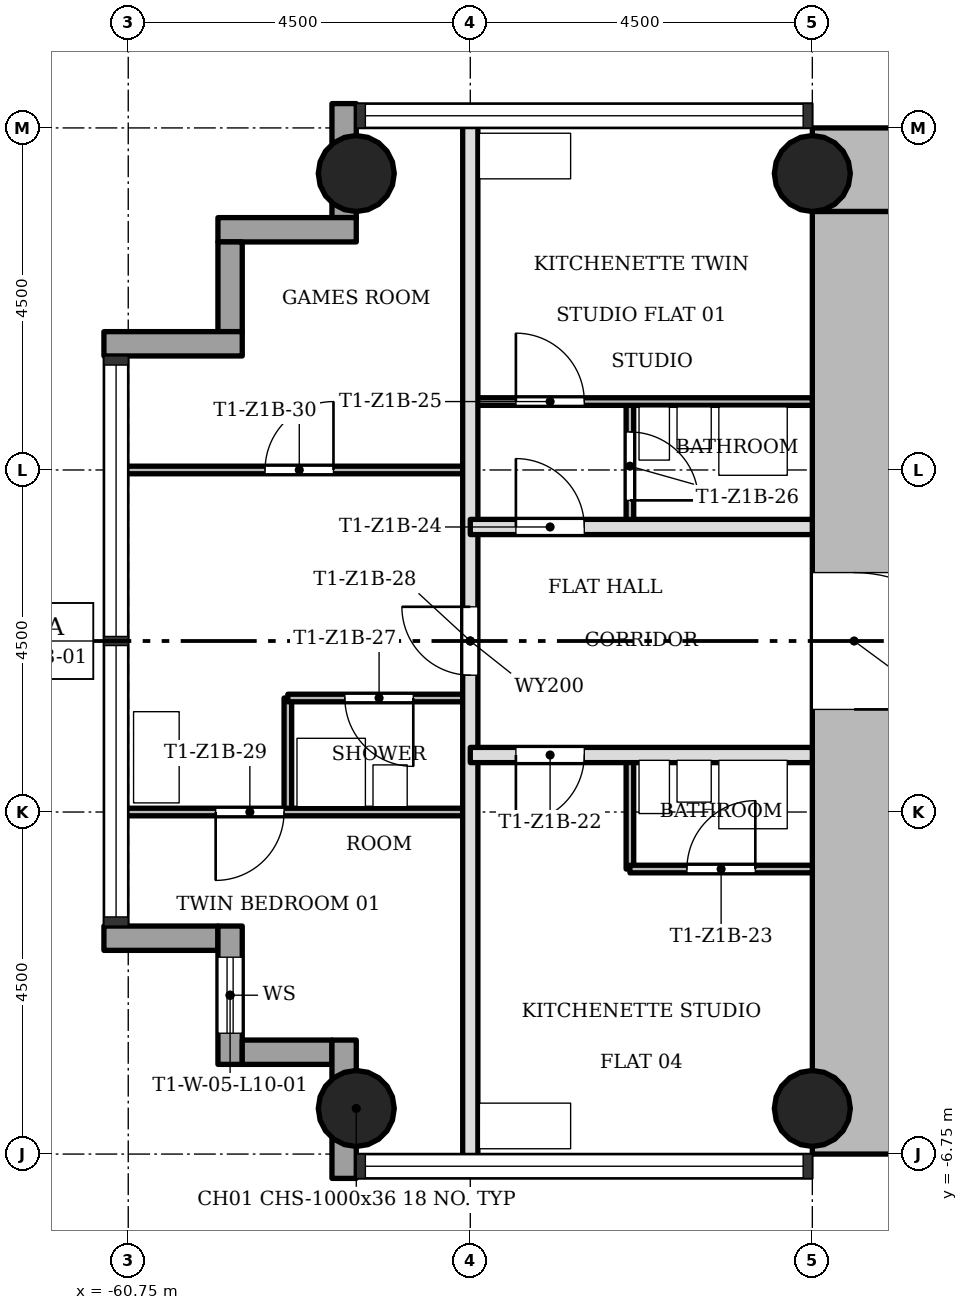
"""IFC4 building model, lengths in metres.
Left out: names, types, materials, properties, quantities, classifications, styles, units other than length and angle.
Written with IfcOpenShell. Run it as: python <this file> out.ifc"""

import sys

from ifc_helpers import new_model, si_unit, direction, frame, frame_2d, origin, origin_2d, place, context, subcontext, project, spatial, rectangle, hollow_circle, extrude, element, fill, save


model = new_model("IFC4")
c1 = context("Model", 3, precision=1e-05, world=origin(), true_north=direction((0.0, 1.0)))
c2 = subcontext(c1, "Body", "Model", "MODEL_VIEW")
j1 = project(units=[si_unit("LENGTHUNIT", "METRE"), si_unit("PLANEANGLEUNIT", "RADIAN")], contexts=[c1])
p1 = place(None, origin())
s1 = spatial("IfcSite", under=j1, at=p1, CompositionType="ELEMENT")
p2 = place(p1, origin())
s2 = spatial("IfcBuilding", under=s1, at=p2, CompositionType="ELEMENT")
p3 = place(p2, frame((0.0, 0.0, 41.5)))
s3 = spatial("IfcBuildingStorey", under=s2, at=p3, CompositionType="ELEMENT", Elevation=41.5)
p4 = place(p3, frame((-43.85, 6.2, 0.0), z_axis=(0.0, 0.0, 1.0), x_axis=(-1.0, 0.0, 0.0)))
e1 = element("IfcWall", 1, at=p4, inside=s3, PredefinedType="SHEAR", context=c2, shape_type="SweptSolid", body=[
    extrude(rectangle(XDim=7.9, YDim=1.1, at=frame_2d((3.95, 0.0))), origin(), (0.0, 0.0, 1.0), 3.4),
])
p5 = place(p3, frame((-51.2, 5.65, 0.0), z_axis=(0.0, 0.0, 1.0), x_axis=(0.0, -1.0, 0.0)))
e2 = element("IfcWall", 2, at=p5, inside=s3, PredefinedType="SHEAR", context=c2, shape_type="SweptSolid", body=[
    extrude(rectangle(XDim=12.4, YDim=1.1, at=frame_2d((6.2, 0.0))), origin(), (0.0, 0.0, 1.0), 3.4),
])
p6 = place(p5, frame((4.75, 0.0, 0.0)))
e3 = element("IfcOpeningElement", 3, at=p6, cuts=e2, PredefinedType="OPENING", context=c2, shape_type="SweptSolid", body=[
    extrude(rectangle(XDim=1.8, YDim=2.1, at=frame_2d((0.9, 1.05))), frame((0.0, 0.56, 0.0), z_axis=(0.0, -1.0, 0.0), x_axis=(1.0, 0.0, 0.0)), (0.0, 0.0, 1.0), 1.12),
])
for number, where, z_axis, x_axis in (
    (4, (-51.75, -6.15, 0.0), (0.0, 0.0, 1.0), (1.0, 0.0, 0.0)),
    (5, (-51.75, 6.15, 0.0), (0.0, 0.0, 1.0), (1.0, 0.0, 0.0)),
    (6, (-57.75, -6.15, 0.0), (0.0, 0.0, 1.0), (1.0, 0.0, 0.0)),
    (7, (-57.75, 6.15, 0.0), (0.0, 0.0, 1.0), (1.0, 0.0, 0.0)),
):
    element("IfcColumn", number, at=place(p3, frame(where, z_axis=z_axis, x_axis=x_axis)), inside=s3, PredefinedType="COLUMN", context=c2, shape_type="SweptSolid", body=[
        extrude(hollow_circle(Radius=0.5, WallThickness=0.036, at=origin_2d()), origin(), (0.0, 0.0, 1.0), 3.4),
    ])
p7 = place(p3, frame((-61.07, -3.91, -0.3), z_axis=(0.0, 0.0, 1.0), x_axis=(1.0, 0.0, 0.0)))
e8 = element("IfcWall", 8, at=p7, inside=s3, PredefinedType="STANDARD", context=c2, shape_type="SweptSolid", body=[
    extrude(rectangle(XDim=1.5, YDim=0.32, at=frame_2d((0.75, 0.0))), origin(), (0.0, 0.0, 1.0), 3.4),
])
p8 = place(p3, frame((-59.41, -3.75, -0.3), z_axis=(0.0, 0.0, 1.0), x_axis=(0.0, -1.0, 0.0)))
e9 = element("IfcWall", 9, at=p8, inside=s3, PredefinedType="STANDARD", context=c2, shape_type="SweptSolid", body=[
    extrude(rectangle(XDim=1.82, YDim=0.32, at=frame_2d((0.91, 0.0))), origin(), (0.0, 0.0, 1.0), 3.4),
])
p9 = place(p8, frame((0.41, 0.0, 1.2)))
e10 = element("IfcOpeningElement", 10, at=p9, cuts=e9, PredefinedType="OPENING", context=c2, shape_type="SweptSolid", body=[
    extrude(rectangle(XDim=1.0, YDim=1.5, at=frame_2d((0.5, 0.75))), frame((0.0, 0.17, 0.0), z_axis=(0.0, -1.0, 0.0), x_axis=(1.0, 0.0, 0.0)), (0.0, 0.0, 1.0), 0.34),
])
p10 = place(p3, frame((-59.25, -5.41, -0.3), z_axis=(0.0, 0.0, 1.0), x_axis=(1.0, 0.0, 0.0)))
e11 = element("IfcWall", 11, at=p10, inside=s3, PredefinedType="STANDARD", context=c2, shape_type="SweptSolid", body=[
    extrude(rectangle(XDim=1.18, YDim=0.32, at=frame_2d((0.59, 0.0))), origin(), (0.0, 0.0, 1.0), 3.4),
])
p11 = place(p3, frame((-57.91, -5.25, -0.3), z_axis=(0.0, 0.0, 1.0), x_axis=(0.0, -1.0, 0.0)))
e12 = element("IfcWall", 12, at=p11, inside=s3, PredefinedType="STANDARD", context=c2, shape_type="SweptSolid", body=[
    extrude(rectangle(XDim=1.82, YDim=0.32, at=frame_2d((0.91, 0.0))), origin(), (0.0, 0.0, 1.0), 3.4),
])
p12 = place(p3, frame((-57.91, 7.07, -0.3), z_axis=(0.0, 0.0, 1.0), x_axis=(0.0, -1.0, 0.0)))
e13 = element("IfcWall", 13, at=p12, inside=s3, PredefinedType="STANDARD", context=c2, shape_type="SweptSolid", body=[
    extrude(rectangle(XDim=1.5, YDim=0.32, at=frame_2d((0.75, 0.0))), origin(), (0.0, 0.0, 1.0), 3.4),
])
p13 = place(p3, frame((-57.75, 5.41, -0.3), z_axis=(0.0, 0.0, 1.0), x_axis=(-1.0, 0.0, 0.0)))
e14 = element("IfcWall", 14, at=p13, inside=s3, PredefinedType="STANDARD", context=c2, shape_type="SweptSolid", body=[
    extrude(rectangle(XDim=1.82, YDim=0.32, at=frame_2d((0.91, 0.0))), origin(), (0.0, 0.0, 1.0), 3.4),
])
p14 = place(p3, frame((-59.41, 5.25, -0.3), z_axis=(0.0, 0.0, 1.0), x_axis=(0.0, -1.0, 0.0)))
e15 = element("IfcWall", 15, at=p14, inside=s3, PredefinedType="STANDARD", context=c2, shape_type="SweptSolid", body=[
    extrude(rectangle(XDim=1.18, YDim=0.32, at=frame_2d((0.59, 0.0))), origin(), (0.0, 0.0, 1.0), 3.4),
])
p15 = place(p3, frame((-59.25, 3.91, -0.3), z_axis=(0.0, 0.0, 1.0), x_axis=(-1.0, 0.0, 0.0)))
e16 = element("IfcWall", 16, at=p15, inside=s3, PredefinedType="STANDARD", context=c2, shape_type="SweptSolid", body=[
    extrude(rectangle(XDim=1.82, YDim=0.32, at=frame_2d((0.91, 0.0))), origin(), (0.0, 0.0, 1.0), 3.4),
])
p16 = place(p3, frame((-58.65, -2.25, 0.0), z_axis=(0.0, 0.0, 1.0), x_axis=(0.0, 1.0, 0.0)))
e17 = element("IfcWall", 17, at=p16, inside=s3, PredefinedType="PARTITIONING", context=c2, shape_type="SweptSolid", body=[
    extrude(rectangle(XDim=1.5, YDim=0.1, at=frame_2d((0.75, 0.0))), origin(), (0.0, 0.0, 1.0), 3.0),
])
p17 = place(p3, frame((-56.25, -6.85, 0.0), z_axis=(0.0, 0.0, 1.0), x_axis=(0.0, 1.0, 0.0)))
e18 = element("IfcWall", 18, at=p17, inside=s3, PredefinedType="SOLIDWALL", context=c2, shape_type="SweptSolid", body=[
    extrude(rectangle(XDim=13.7, YDim=0.2, at=frame_2d((6.85, 0.0))), origin(), (0.0, 0.0, 1.0), 3.0),
])
p18 = place(p17, frame((6.4, 0.0, 0.0)))
e19 = element("IfcOpeningElement", 19, at=p18, cuts=e18, PredefinedType="OPENING", context=c2, shape_type="SweptSolid", body=[
    extrude(rectangle(XDim=0.9, YDim=2.1, at=frame_2d((0.45, 1.05))), frame((0.0, 0.11, 0.0), z_axis=(0.0, -1.0, 0.0), x_axis=(1.0, 0.0, 0.0)), (0.0, 0.0, 1.0), 0.22),
])
p19 = place(p3, frame((-54.15, -3.0, 0.0), z_axis=(0.0, 0.0, 1.0), x_axis=(0.0, 1.0, 0.0)))
e20 = element("IfcWall", 20, at=p19, inside=s3, PredefinedType="PARTITIONING", context=c2, shape_type="SweptSolid", body=[
    extrude(rectangle(XDim=1.5, YDim=0.1, at=frame_2d((0.75, 0.0))), origin(), (0.0, 0.0, 1.0), 3.0),
])
p20 = place(p3, frame((-54.15, 1.5, 0.0), z_axis=(0.0, 0.0, 1.0), x_axis=(0.0, 1.0, 0.0)))
e21 = element("IfcWall", 21, at=p20, inside=s3, PredefinedType="PARTITIONING", context=c2, shape_type="SweptSolid", body=[
    extrude(rectangle(XDim=1.65, YDim=0.1, at=frame_2d((0.825, 0.0))), origin(), (0.0, 0.0, 1.0), 3.0),
])
p21 = place(p20, frame((0.35, 0.0, 0.0)))
e22 = element("IfcOpeningElement", 22, at=p21, cuts=e21, PredefinedType="OPENING", context=c2, shape_type="SweptSolid", body=[
    extrude(rectangle(XDim=0.9, YDim=2.1, at=frame_2d((0.45, 1.05))), frame((0.0, 0.06, 0.0), z_axis=(0.0, -1.0, 0.0), x_axis=(1.0, 0.0, 0.0)), (0.0, 0.0, 1.0), 0.12),
])
p22 = place(p3, frame((-54.15, -3.0, 0.0), z_axis=(0.0, 0.0, 1.0), x_axis=(1.0, 0.0, 0.0)))
e23 = element("IfcWall", 23, at=p22, inside=s3, PredefinedType="PARTITIONING", context=c2, shape_type="SweptSolid", body=[
    extrude(rectangle(XDim=2.4, YDim=0.1, at=frame_2d((1.2, 0.0))), origin(), (0.0, 0.0, 1.0), 3.0),
])
p23 = place(p22, frame((0.75, 0.0, 0.0)))
e24 = element("IfcOpeningElement", 24, at=p23, cuts=e23, PredefinedType="OPENING", context=c2, shape_type="SweptSolid", body=[
    extrude(rectangle(XDim=0.9, YDim=2.1, at=frame_2d((0.45, 1.05))), frame((0.0, 0.06, 0.0), z_axis=(0.0, -1.0, 0.0), x_axis=(1.0, 0.0, 0.0)), (0.0, 0.0, 1.0), 0.12),
])
p24 = place(p3, frame((-60.85, -2.25, 0.0), z_axis=(0.0, 0.0, 1.0), x_axis=(1.0, 0.0, 0.0)))
e25 = element("IfcWall", 25, at=p24, inside=s3, PredefinedType="PARTITIONING", context=c2, shape_type="SweptSolid", body=[
    extrude(rectangle(XDim=4.6, YDim=0.1, at=frame_2d((2.3, 0.0))), origin(), (0.0, 0.0, 1.0), 3.0),
])
p25 = place(p24, frame((1.25, 0.0, 0.0)))
e26 = element("IfcOpeningElement", 26, at=p25, cuts=e25, PredefinedType="OPENING", context=c2, shape_type="SweptSolid", body=[
    extrude(rectangle(XDim=0.9, YDim=2.1, at=frame_2d((0.45, 1.05))), frame((0.0, 0.06, 0.0), z_axis=(0.0, -1.0, 0.0), x_axis=(1.0, 0.0, 0.0)), (0.0, 0.0, 1.0), 0.12),
])
p26 = place(p3, frame((-56.25, -1.5, 0.0), z_axis=(0.0, 0.0, 1.0), x_axis=(1.0, 0.0, 0.0)))
e27 = element("IfcWall", 27, at=p26, inside=s3, PredefinedType="SOLIDWALL", context=c2, shape_type="SweptSolid", body=[
    extrude(rectangle(XDim=4.5, YDim=0.2, at=frame_2d((2.25, 0.0))), origin(), (0.0, 0.0, 1.0), 3.0),
])
p27 = place(p26, frame((0.6, 0.0, 0.0)))
e28 = element("IfcOpeningElement", 28, at=p27, cuts=e27, PredefinedType="OPENING", context=c2, shape_type="SweptSolid", body=[
    extrude(rectangle(XDim=0.9, YDim=2.1, at=frame_2d((0.45, 1.05))), frame((0.0, 0.11, 0.0), z_axis=(0.0, -1.0, 0.0), x_axis=(1.0, 0.0, 0.0)), (0.0, 0.0, 1.0), 0.22),
])
p28 = place(p3, frame((-58.65, -0.75, 0.0), z_axis=(0.0, 0.0, 1.0), x_axis=(1.0, 0.0, 0.0)))
e29 = element("IfcWall", 29, at=p28, inside=s3, PredefinedType="PARTITIONING", context=c2, shape_type="SweptSolid", body=[
    extrude(rectangle(XDim=2.4, YDim=0.1, at=frame_2d((1.2, 0.0))), origin(), (0.0, 0.0, 1.0), 3.0),
])
p29 = place(p28, frame((0.75, 0.0, 0.0)))
e30 = element("IfcOpeningElement", 30, at=p29, cuts=e29, PredefinedType="OPENING", context=c2, shape_type="SweptSolid", body=[
    extrude(rectangle(XDim=0.9, YDim=2.1, at=frame_2d((0.45, 1.05))), frame((0.0, 0.06, 0.0), z_axis=(0.0, -1.0, 0.0), x_axis=(1.0, 0.0, 0.0)), (0.0, 0.0, 1.0), 0.12),
])
p30 = place(p3, frame((-56.25, 1.5, 0.0), z_axis=(0.0, 0.0, 1.0), x_axis=(1.0, 0.0, 0.0)))
e31 = element("IfcWall", 31, at=p30, inside=s3, PredefinedType="SOLIDWALL", context=c2, shape_type="SweptSolid", body=[
    extrude(rectangle(XDim=4.5, YDim=0.2, at=frame_2d((2.25, 0.0))), origin(), (0.0, 0.0, 1.0), 3.0),
])
p31 = place(p30, frame((0.6, 0.0, 0.0)))
e32 = element("IfcOpeningElement", 32, at=p31, cuts=e31, PredefinedType="OPENING", context=c2, shape_type="SweptSolid", body=[
    extrude(rectangle(XDim=0.9, YDim=2.1, at=frame_2d((0.45, 1.05))), frame((0.0, 0.11, 0.0), z_axis=(0.0, -1.0, 0.0), x_axis=(1.0, 0.0, 0.0)), (0.0, 0.0, 1.0), 0.22),
])
p32 = place(p3, frame((-60.85, 2.25, 0.0), z_axis=(0.0, 0.0, 1.0), x_axis=(1.0, 0.0, 0.0)))
e33 = element("IfcWall", 33, at=p32, inside=s3, PredefinedType="PARTITIONING", context=c2, shape_type="SweptSolid", body=[
    extrude(rectangle(XDim=4.6, YDim=0.1, at=frame_2d((2.3, 0.0))), origin(), (0.0, 0.0, 1.0), 3.0),
])
p33 = place(p32, frame((1.9, 0.0, 0.0)))
e34 = element("IfcOpeningElement", 34, at=p33, cuts=e33, PredefinedType="OPENING", context=c2, shape_type="SweptSolid", body=[
    extrude(rectangle(XDim=0.9, YDim=2.1, at=frame_2d((0.45, 1.05))), frame((0.0, 0.06, 0.0), z_axis=(0.0, -1.0, 0.0), x_axis=(1.0, 0.0, 0.0)), (0.0, 0.0, 1.0), 0.12),
])
p34 = place(p3, frame((-56.25, 3.15, 0.0), z_axis=(0.0, 0.0, 1.0), x_axis=(1.0, 0.0, 0.0)))
e35 = element("IfcWall", 35, at=p34, inside=s3, PredefinedType="PARTITIONING", context=c2, shape_type="SweptSolid", body=[
    extrude(rectangle(XDim=4.5, YDim=0.1, at=frame_2d((2.25, 0.0))), origin(), (0.0, 0.0, 1.0), 3.0),
])
p35 = place(p34, frame((0.6, 0.0, 0.0)))
e36 = element("IfcOpeningElement", 36, at=p35, cuts=e35, PredefinedType="OPENING", context=c2, shape_type="SweptSolid", body=[
    extrude(rectangle(XDim=0.9, YDim=2.1, at=frame_2d((0.45, 1.05))), frame((0.0, 0.06, 0.0), z_axis=(0.0, -1.0, 0.0), x_axis=(1.0, 0.0, 0.0)), (0.0, 0.0, 1.0), 0.12),
])
p36 = place(p27, origin())
e37 = element("IfcDoor", 37, at=p36, inside=s3, OperationType="SINGLE_SWING_LEFT", PredefinedType="DOOR", context=c2, shape_type="SweptSolid", body=[
    extrude(rectangle(XDim=0.9, YDim=2.1, at=frame_2d((0.45, 1.05))), frame((0.0, 0.025, 0.0), z_axis=(0.0, -1.0, 0.0), x_axis=(1.0, 0.0, 0.0)), (0.0, 0.0, 1.0), 0.05),
])
fill(e28, e37)
p37 = place(p23, origin())
e38 = element("IfcDoor", 38, at=p37, inside=s3, OperationType="SINGLE_SWING_LEFT", PredefinedType="DOOR", context=c2, shape_type="SweptSolid", body=[
    extrude(rectangle(XDim=0.9, YDim=2.1, at=frame_2d((0.45, 1.05))), frame((0.0, 0.025, 0.0), z_axis=(0.0, -1.0, 0.0), x_axis=(1.0, 0.0, 0.0)), (0.0, 0.0, 1.0), 0.05),
])
fill(e24, e38)
p38 = place(p31, origin())
e39 = element("IfcDoor", 39, at=p38, inside=s3, OperationType="SINGLE_SWING_RIGHT", PredefinedType="DOOR", context=c2, shape_type="SweptSolid", body=[
    extrude(rectangle(XDim=0.9, YDim=2.1, at=frame_2d((0.45, 1.05))), frame((0.0, 0.025, 0.0), z_axis=(0.0, -1.0, 0.0), x_axis=(1.0, 0.0, 0.0)), (0.0, 0.0, 1.0), 0.05),
])
fill(e32, e39)
p39 = place(p35, origin())
e40 = element("IfcDoor", 40, at=p39, inside=s3, OperationType="SINGLE_SWING_RIGHT", PredefinedType="DOOR", context=c2, shape_type="SweptSolid", body=[
    extrude(rectangle(XDim=0.9, YDim=2.1, at=frame_2d((0.45, 1.05))), frame((0.0, 0.025, 0.0), z_axis=(0.0, -1.0, 0.0), x_axis=(1.0, 0.0, 0.0)), (0.0, 0.0, 1.0), 0.05),
])
fill(e36, e40)
p40 = place(p21, origin())
e41 = element("IfcDoor", 41, at=p40, inside=s3, OperationType="SINGLE_SWING_LEFT", PredefinedType="DOOR", context=c2, shape_type="SweptSolid", body=[
    extrude(rectangle(XDim=0.9, YDim=2.1, at=frame_2d((0.45, 1.05))), frame((0.0, 0.025, 0.0), z_axis=(0.0, -1.0, 0.0), x_axis=(1.0, 0.0, 0.0)), (0.0, 0.0, 1.0), 0.05),
])
fill(e22, e41)
p41 = place(p29, origin())
e42 = element("IfcDoor", 42, at=p41, inside=s3, OperationType="SINGLE_SWING_RIGHT", PredefinedType="DOOR", context=c2, shape_type="SweptSolid", body=[
    extrude(rectangle(XDim=0.9, YDim=2.1, at=frame_2d((0.45, 1.05))), frame((0.0, 0.025, 0.0), z_axis=(0.0, -1.0, 0.0), x_axis=(1.0, 0.0, 0.0)), (0.0, 0.0, 1.0), 0.05),
])
fill(e30, e42)
p42 = place(p18, origin())
e43 = element("IfcDoor", 43, at=p42, inside=s3, OperationType="SINGLE_SWING_LEFT", PredefinedType="DOOR", context=c2, shape_type="SweptSolid", body=[
    extrude(rectangle(XDim=0.9, YDim=2.1, at=frame_2d((0.45, 1.05))), frame((0.0, 0.025, 0.0), z_axis=(0.0, -1.0, 0.0), x_axis=(1.0, 0.0, 0.0)), (0.0, 0.0, 1.0), 0.05),
])
fill(e19, e43)
p43 = place(p25, origin())
e44 = element("IfcDoor", 44, at=p43, inside=s3, OperationType="SINGLE_SWING_LEFT", PredefinedType="DOOR", context=c2, shape_type="SweptSolid", body=[
    extrude(rectangle(XDim=0.9, YDim=2.1, at=frame_2d((0.45, 1.05))), frame((0.0, 0.025, 0.0), z_axis=(0.0, -1.0, 0.0), x_axis=(1.0, 0.0, 0.0)), (0.0, 0.0, 1.0), 0.05),
])
fill(e26, e44)
p44 = place(p33, origin())
e45 = element("IfcDoor", 45, at=p44, inside=s3, OperationType="SINGLE_SWING_LEFT", PredefinedType="DOOR", context=c2, shape_type="SweptSolid", body=[
    extrude(rectangle(XDim=0.9, YDim=2.1, at=frame_2d((0.45, 1.05))), frame((0.0, 0.025, 0.0), z_axis=(0.0, -1.0, 0.0), x_axis=(1.0, 0.0, 0.0)), (0.0, 0.0, 1.0), 0.05),
])
fill(e34, e45)
p45 = place(p6, origin())
e46 = element("IfcDoor", 46, at=p45, inside=s3, OperationType="SINGLE_SWING_LEFT", PredefinedType="DOOR", context=c2, shape_type="SweptSolid", body=[
    extrude(rectangle(XDim=1.8, YDim=2.1, at=frame_2d((0.9, 1.05))), frame((0.0, 0.025, 0.0), z_axis=(0.0, -1.0, 0.0), x_axis=(1.0, 0.0, 0.0)), (0.0, 0.0, 1.0), 0.05),
])
fill(e3, e46)
p46 = place(p9, origin())
e47 = element("IfcWindow", 47, at=p46, inside=s3, PartitioningType="SINGLE_PANEL", PredefinedType="WINDOW", context=c2, shape_type="SweptSolid", body=[
    extrude(rectangle(XDim=1.0, YDim=1.5, at=frame_2d((0.5, 0.75))), frame((0.0, 0.03, 0.0), z_axis=(0.0, -1.0, 0.0), x_axis=(1.0, 0.0, 0.0)), (0.0, 0.0, 1.0), 0.06),
])
fill(e10, e47)
save(model, sys.argv[1])
